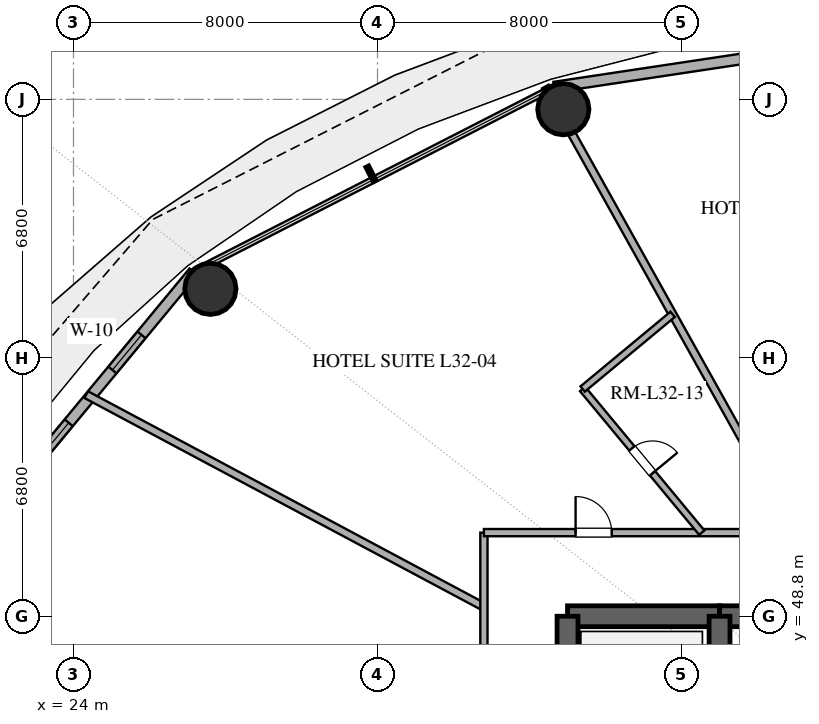
"""IFC4 building model, lengths in metres.
Left out: names, types, materials, properties, quantities, classifications, styles, units other than length and angle.
Written with IfcOpenShell. Run it as: python <this file> out.ifc"""

import sys

from ifc_helpers import new_model, si_unit, direction, frame, frame_2d, origin, origin_2d, place, context, subcontext, project, spatial, rectangle, hollow_circle, extrude, element, fill, save


model = new_model("IFC4")
c1 = context("Model", 3, precision=1e-05, world=origin(), true_north=direction((0.0, 1.0)))
c2 = subcontext(c1, "Body", "Model", "MODEL_VIEW")
j1 = project(units=[si_unit("LENGTHUNIT", "METRE"), si_unit("PLANEANGLEUNIT", "RADIAN")], contexts=[c1])
p1 = place(None, origin())
s1 = spatial("IfcSite", under=j1, at=p1, CompositionType="ELEMENT")
p2 = place(p1, origin())
s2 = spatial("IfcBuilding", under=s1, at=p2, CompositionType="ELEMENT")
p3 = place(p2, frame((0.0, 0.0, 127.2)))
s3 = spatial("IfcBuildingStorey", under=s2, at=p3, CompositionType="ELEMENT", Elevation=127.2)
p4 = place(p3, frame((37.0, 48.8, 0.0), z_axis=(0.0, 0.0, 1.0), x_axis=(1.0, 0.0, 0.0)))
e1 = element("IfcWall", 1, at=p4, inside=s3, PredefinedType="SHEAR", context=c2, shape_type="SweptSolid", body=[
    extrude(rectangle(XDim=4.0, YDim=0.55, at=frame_2d((2.0, 0.0))), origin(), (0.0, 0.0, 1.0), 3.38),
])
p5 = place(p3, frame((41.0, 48.8, 0.0), z_axis=(0.0, 0.0, 1.0), x_axis=(1.0, 0.0, 0.0)))
e2 = element("IfcWall", 2, at=p5, inside=s3, PredefinedType="SHEAR", context=c2, shape_type="SweptSolid", body=[
    extrude(rectangle(XDim=14.0, YDim=0.55, at=frame_2d((7.0, 0.0))), origin(), (0.0, 0.0, 1.0), 3.38),
])
p6 = place(p5, frame((6.1, 0.0, 0.0)))
e3 = element("IfcOpeningElement", 3, at=p6, cuts=e2, PredefinedType="OPENING", context=c2, shape_type="SweptSolid", body=[
    extrude(rectangle(XDim=1.8, YDim=2.25, at=frame_2d((0.9, 1.125))), frame((0.0, 0.285, 0.0), z_axis=(0.0, -1.0, 0.0), x_axis=(1.0, 0.0, 0.0)), (0.0, 0.0, 1.0), 0.57),
])
p7 = place(p3, frame((37.0, 35.2, 0.0), z_axis=(0.0, 0.0, 1.0), x_axis=(0.0, 1.0, 0.0)))
e4 = element("IfcWall", 4, at=p7, inside=s3, PredefinedType="SHEAR", context=c2, shape_type="SweptSolid", body=[
    extrude(rectangle(XDim=13.6, YDim=0.55, at=frame_2d((6.8, 0.0))), origin(), (0.0, 0.0, 1.0), 3.38),
])
p8 = place(p7, frame((1.5, 0.0, 0.0)))
e5 = element("IfcOpeningElement", 5, at=p8, cuts=e4, PredefinedType="OPENING", context=c2, shape_type="SweptSolid", body=[
    extrude(rectangle(XDim=1.2, YDim=2.15, at=frame_2d((0.6, 1.075))), frame((0.0, 0.285, 0.0), z_axis=(0.0, -1.0, 0.0), x_axis=(1.0, 0.0, 0.0)), (0.0, 0.0, 1.0), 0.57),
])
p9 = place(p3, frame((41.0, 35.2, 0.0), z_axis=(0.0, 0.0, 1.0), x_axis=(0.0, 1.0, 0.0)))
e6 = element("IfcWall", 6, at=p9, inside=s3, PredefinedType="SHEAR", context=c2, shape_type="SweptSolid", body=[
    extrude(rectangle(XDim=13.6, YDim=0.55, at=frame_2d((6.8, 0.0))), origin(), (0.0, 0.0, 1.0), 3.38),
])
p10 = place(p9, frame((1.15, 0.0, 0.0)))
e7 = element("IfcOpeningElement", 7, at=p10, cuts=e6, PredefinedType="OPENING", context=c2, shape_type="SweptSolid", body=[
    extrude(rectangle(XDim=1.1, YDim=2.2, at=frame_2d((0.55, 1.1))), frame((0.0, 0.285, 0.0), z_axis=(0.0, -1.0, 0.0), x_axis=(1.0, 0.0, 0.0)), (0.0, 0.0, 1.0), 0.57),
])
for number, where, z_axis, x_axis in (
    (8, (36.89, 62.141, 0.0), (0.0, 0.0, 1.0), (1.0, 0.0, 0.0)),
    (9, (27.602, 57.415, 0.0), (0.0, 0.0, 1.0), (1.0, 0.0, 0.0)),
):
    element("IfcColumn", number, at=place(p3, frame(where, z_axis=z_axis, x_axis=x_axis)), inside=s3, PredefinedType="COLUMN", context=c2, shape_type="SweptSolid", body=[
        extrude(hollow_circle(Radius=0.675, WallThickness=0.036, at=origin_2d()), origin(), (0.0, 0.0, 1.0), 3.38),
    ])
p11 = place(p3, frame((48.0, 64.43, 0.0), z_axis=(0.0, 0.0, 1.0), x_axis=(-0.988877774656, -0.148730450117, 0.0)))
e10 = element("IfcWall", 10, at=p11, inside=s3, PredefinedType="SOLIDWALL", context=c2, shape_type="SweptSolid", body=[
    extrude(rectangle(XDim=11.479, YDim=0.28, at=frame_2d((5.74, 0.0))), origin(), (0.0, 0.0, 1.0), 3.38),
])
p12 = place(p11, frame((1.524, 0.0, 0.0)))
e11 = element("IfcOpeningElement", 11, at=p12, cuts=e10, PredefinedType="OPENING", context=c2, shape_type="SweptSolid", body=[
    extrude(rectangle(XDim=1.4, YDim=2.2, at=frame_2d((0.7, 1.1))), frame((0.0, 0.15, 0.0), z_axis=(0.0, -1.0, 0.0), x_axis=(1.0, 0.0, 0.0)), (0.0, 0.0, 1.0), 0.3),
])
p13 = place(p3, frame((27.16, 57.86, 0.0), z_axis=(0.0, 0.0, 1.0), x_axis=(-0.637505817448, -0.770445541696, 0.0)))
e12 = element("IfcWall", 12, at=p13, inside=s3, PredefinedType="SOLIDWALL", context=c2, shape_type="SweptSolid", body=[
    extrude(rectangle(XDim=9.445, YDim=0.28, at=frame_2d((4.723, 0.0))), origin(), (0.0, 0.0, 1.0), 3.38),
])
p14 = place(p13, frame((2.15, 0.0, 0.85)))
e13 = element("IfcOpeningElement", 13, at=p14, cuts=e12, PredefinedType="OPENING", context=c2, shape_type="SweptSolid", body=[
    extrude(rectangle(XDim=1.2, YDim=1.6, at=frame_2d((0.6, 0.8))), frame((0.0, 0.15, 0.0), z_axis=(0.0, -1.0, 0.0), x_axis=(1.0, 0.0, 0.0)), (0.0, 0.0, 1.0), 0.3),
])
p15 = place(p13, frame((5.153, 0.0, 0.85)))
e14 = element("IfcOpeningElement", 14, at=p15, cuts=e12, PredefinedType="OPENING", context=c2, shape_type="SweptSolid", body=[
    extrude(rectangle(XDim=2.1, YDim=2.2, at=frame_2d((1.05, 1.1))), frame((0.0, 0.15, 0.0), z_axis=(0.0, -1.0, 0.0), x_axis=(1.0, 0.0, 0.0)), (0.0, 0.0, 1.0), 0.3),
])
p16 = place(p3, frame((24.335, 54.631, 0.0), z_axis=(0.0, 0.0, 1.0), x_axis=(0.882197358086, -0.470879837524, 0.0)))
e15 = element("IfcWall", 15, at=p16, inside=s3, PredefinedType="PARTITIONING", context=c2, shape_type="SweptSolid", body=[
    extrude(rectangle(XDim=11.862, YDim=0.2, at=frame_2d((5.931, 0.0))), origin(), (0.0, 0.0, 1.0), 2.74),
])
p17 = place(p3, frame((34.8, 38.396, 0.0), z_axis=(0.0, 0.0, 1.0), x_axis=(0.0, 1.0, 0.0)))
e16 = element("IfcWall", 16, at=p17, inside=s3, PredefinedType="PARTITIONING", context=c2, shape_type="SweptSolid", body=[
    extrude(rectangle(XDim=12.604, YDim=0.19, at=frame_2d((6.302, 0.0))), origin(), (0.0, 0.0, 1.0), 2.74),
])
p18 = place(p17, frame((6.094, 0.0, 0.0)))
e17 = element("IfcOpeningElement", 17, at=p18, cuts=e16, PredefinedType="OPENING", context=c2, shape_type="SweptSolid", body=[
    extrude(rectangle(XDim=1.0, YDim=2.2, at=frame_2d((0.5, 1.1))), frame((0.0, 0.105, 0.0), z_axis=(0.0, -1.0, 0.0), x_axis=(1.0, 0.0, 0.0)), (0.0, 0.0, 1.0), 0.21),
])
p19 = place(p3, frame((42.974, 51.0, 0.0), z_axis=(0.0, 0.0, 1.0), x_axis=(-0.487587337482, 0.873074216964, 0.0)))
e18 = element("IfcWall", 18, at=p19, inside=s3, PredefinedType="PARTITIONING", context=c2, shape_type="SweptSolid", body=[
    extrude(rectangle(XDim=13.446, YDim=0.2, at=frame_2d((6.723, 0.0))), origin(), (0.0, 0.0, 1.0), 2.74),
])
p20 = place(p3, frame((34.8, 51.0, 0.0), z_axis=(0.0, 0.0, 1.0), x_axis=(1.0, 0.0, 0.0)))
e19 = element("IfcWall", 19, at=p20, inside=s3, PredefinedType="PARTITIONING", context=c2, shape_type="SweptSolid", body=[
    extrude(rectangle(XDim=8.21, YDim=0.19, at=frame_2d((4.105, 0.0))), origin(), (0.0, 0.0, 1.0), 2.74),
])
p21 = place(p20, frame((2.412, 0.0, 0.0)))
e20 = element("IfcOpeningElement", 20, at=p21, cuts=e19, PredefinedType="OPENING", context=c2, shape_type="SweptSolid", body=[
    extrude(rectangle(XDim=0.95, YDim=2.15, at=frame_2d((0.475, 1.075))), frame((0.0, 0.105, 0.0), z_axis=(0.0, -1.0, 0.0), x_axis=(1.0, 0.0, 0.0)), (0.0, 0.0, 1.0), 0.21),
])
p22 = place(p3, frame((37.398, 54.778, 0.0), z_axis=(0.0, 0.0, 1.0), x_axis=(0.638549285416, -0.769580931478, 0.0)))
e21 = element("IfcWall", 21, at=p22, inside=s3, PredefinedType="PLUMBINGWALL", context=c2, shape_type="SweptSolid", body=[
    extrude(rectangle(XDim=4.91, YDim=0.18, at=frame_2d((2.455, 0.0))), origin(), (0.0, 0.0, 1.0), 2.74),
])
p23 = place(p22, frame((2.03, 0.0, 0.0)))
e22 = element("IfcOpeningElement", 22, at=p23, cuts=e21, PredefinedType="OPENING", context=c2, shape_type="SweptSolid", body=[
    extrude(rectangle(XDim=0.85, YDim=2.1, at=frame_2d((0.425, 1.05))), frame((0.0, 0.1, 0.0), z_axis=(0.0, -1.0, 0.0), x_axis=(1.0, 0.0, 0.0)), (0.0, 0.0, 1.0), 0.2),
])
p24 = place(p3, frame((39.766, 56.743, 0.0), z_axis=(0.0, 0.0, 1.0), x_axis=(-0.769591554132, -0.638536482755, 0.0)))
e23 = element("IfcWall", 23, at=p24, inside=s3, PredefinedType="PLUMBINGWALL", context=c2, shape_type="SweptSolid", body=[
    extrude(rectangle(XDim=3.077, YDim=0.18, at=frame_2d((1.539, 0.0))), origin(), (0.0, 0.0, 1.0), 2.74),
])
p25 = place(p14, origin())
e24 = element("IfcWindow", 24, at=p25, inside=s3, PartitioningType="SINGLE_PANEL", PredefinedType="WINDOW", context=c2, shape_type="SweptSolid", body=[
    extrude(rectangle(XDim=1.2, YDim=1.6, at=frame_2d((0.6, 0.8))), frame((0.0, 0.03, 0.0), z_axis=(0.0, -1.0, 0.0), x_axis=(1.0, 0.0, 0.0)), (0.0, 0.0, 1.0), 0.06),
])
fill(e13, e24)
p26 = place(p15, origin())
e25 = element("IfcWindow", 25, at=p26, inside=s3, PartitioningType="SINGLE_PANEL", PredefinedType="WINDOW", context=c2, shape_type="SweptSolid", body=[
    extrude(rectangle(XDim=2.1, YDim=2.2, at=frame_2d((1.05, 1.1))), frame((0.0, 0.03, 0.0), z_axis=(0.0, -1.0, 0.0), x_axis=(1.0, 0.0, 0.0)), (0.0, 0.0, 1.0), 0.06),
])
fill(e14, e25)
p27 = place(p21, origin())
e26 = element("IfcDoor", 26, at=p27, inside=s3, OperationType="SINGLE_SWING_LEFT", PredefinedType="DOOR", context=c2, shape_type="SweptSolid", body=[
    extrude(rectangle(XDim=0.95, YDim=2.15, at=frame_2d((0.475, 1.075))), frame((0.0, 0.025, 0.0), z_axis=(0.0, -1.0, 0.0), x_axis=(1.0, 0.0, 0.0)), (0.0, 0.0, 1.0), 0.05),
])
fill(e20, e26)
p28 = place(p23, origin())
e27 = element("IfcDoor", 27, at=p28, inside=s3, OperationType="SINGLE_SWING_RIGHT", PredefinedType="DOOR", context=c2, shape_type="SweptSolid", body=[
    extrude(rectangle(XDim=0.85, YDim=2.1, at=frame_2d((0.425, 1.05))), frame((0.0, 0.025, 0.0), z_axis=(0.0, -1.0, 0.0), x_axis=(1.0, 0.0, 0.0)), (0.0, 0.0, 1.0), 0.05),
])
fill(e22, e27)
save(model, sys.argv[1])
